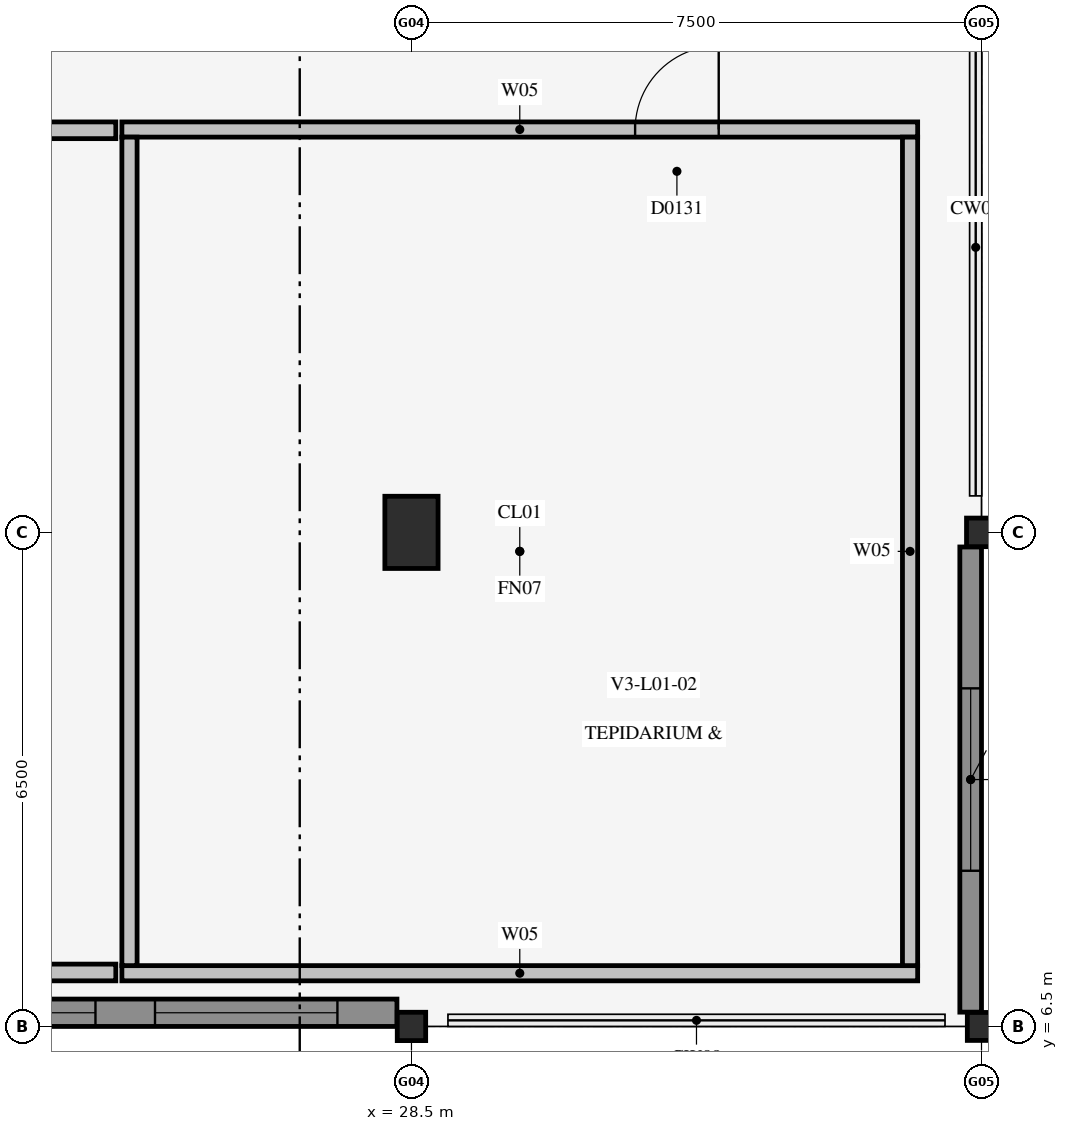
"""IFC4 building model, lengths in metres.
Left out: names, types, materials, properties, quantities, classifications, styles, units other than length and angle.
Written with IfcOpenShell. Run it as: python <this file> out.ifc"""

import sys

from ifc_helpers import new_model, si_unit, direction, frame, frame_2d, origin, origin_2d, place, context, subcontext, project, spatial, rectangle, i_section, extrude, element, fill, save


model = new_model("IFC4")
c1 = context("Model", 3, precision=1e-05, world=origin(), true_north=direction((0.0, 1.0)))
c2 = subcontext(c1, "Body", "Model", "MODEL_VIEW")
j1 = project(units=[si_unit("LENGTHUNIT", "METRE"), si_unit("PLANEANGLEUNIT", "RADIAN")], contexts=[c1])
p1 = place(None, origin())
s1 = spatial("IfcSite", under=j1, at=p1, CompositionType="ELEMENT")
p2 = place(p1, origin())
s2 = spatial("IfcBuilding", under=s1, at=p2, CompositionType="ELEMENT")
p3 = place(p2, frame((0.0, 0.0, 5.4)))
s3 = spatial("IfcBuildingStorey", under=s2, at=p3, CompositionType="ELEMENT", Elevation=5.4)
p4 = place(p3, frame((28.5, 6.5, 0.0), z_axis=(0.0, 0.0, 1.0), x_axis=(1.0, 0.0, 0.0)))
e1 = element("IfcColumn", 1, at=p4, inside=s3, PredefinedType="COLUMN", context=c2, shape_type="SweptSolid", body=[
    extrude(i_section(OverallWidth=0.374, OverallDepth=0.373, WebThickness=0.016, FlangeThickness=0.026, FilletRadius=0.014, at=origin_2d()), origin(), (0.0, 0.0, 1.0), 4.6),
])
p5 = place(p3, frame((28.5, 13.0, 0.0), z_axis=(0.0, 0.0, 1.0), x_axis=(1.0, 0.0, 0.0)))
e2 = element("IfcColumn", 2, at=p5, inside=s3, PredefinedType="COLUMN", context=c2, shape_type="SweptSolid", body=[
    extrude(rectangle(XDim=0.7, YDim=0.95, at=origin_2d()), origin(), (0.0, 0.0, 1.0), 4.6),
])
p6 = place(p3, frame((36.0, 6.5, 0.0), z_axis=(0.0, 0.0, 1.0), x_axis=(1.0, 0.0, 0.0)))
e3 = element("IfcColumn", 3, at=p6, inside=s3, PredefinedType="COLUMN", context=c2, shape_type="SweptSolid", body=[
    extrude(i_section(OverallWidth=0.373, OverallDepth=0.368, WebThickness=0.015, FlangeThickness=0.024, FilletRadius=0.014, at=origin_2d()), origin(), (0.0, 0.0, 1.0), 4.6),
])
p7 = place(p3, frame((36.0, 13.0, 0.0), z_axis=(0.0, 0.0, 1.0), x_axis=(1.0, 0.0, 0.0)))
e4 = element("IfcColumn", 4, at=p7, inside=s3, PredefinedType="COLUMN", context=c2, shape_type="SweptSolid", body=[
    extrude(i_section(OverallWidth=0.394, OverallDepth=0.376, WebThickness=0.017, FlangeThickness=0.028, FilletRadius=0.014, at=origin_2d()), origin(), (0.0, 0.0, 1.0), 4.6),
])
p8 = place(p3, frame((14.14, 7.21, 0.0), z_axis=(0.0, 0.0, 1.0), x_axis=(1.0, 0.0, 0.0)))
e5 = element("IfcWall", 5, at=p8, inside=s3, PredefinedType="PLUMBINGWALL", context=c2, shape_type="SweptSolid", body=[
    extrude(rectangle(XDim=10.47, YDim=0.22, at=frame_2d((5.235, 0.0))), origin(), (0.0, 0.0, 1.0), 4.435),
])
p9 = place(p3, frame((14.14, 18.29, 0.0), z_axis=(0.0, 0.0, 1.0), x_axis=(1.0, 0.0, 0.0)))
e6 = element("IfcWall", 6, at=p9, inside=s3, PredefinedType="PLUMBINGWALL", context=c2, shape_type="SweptSolid", body=[
    extrude(rectangle(XDim=10.47, YDim=0.22, at=frame_2d((5.235, 0.0))), origin(), (0.0, 0.0, 1.0), 4.435),
])
p10 = place(p9, frame((2.63, 0.0, 0.0)))
e7 = element("IfcOpeningElement", 7, at=p10, cuts=e6, PredefinedType="OPENING", context=c2, shape_type="SweptSolid", body=[
    extrude(rectangle(XDim=1.05, YDim=2.15, at=frame_2d((0.525, 1.075))), frame((0.0, 0.122, 0.0), z_axis=(0.0, -1.0, 0.0), x_axis=(1.0, 0.0, 0.0)), (0.0, 0.0, 1.0), 0.244),
])
p11 = place(p3, frame((24.69, 7.2, 0.0), z_axis=(0.0, 0.0, 1.0), x_axis=(1.0, 0.0, 0.0)))
e8 = element("IfcWall", 8, at=p11, inside=s3, PredefinedType="PLUMBINGWALL", context=c2, shape_type="SweptSolid", body=[
    extrude(rectangle(XDim=10.47, YDim=0.2, at=frame_2d((5.235, 0.0))), origin(), (0.0, 0.0, 1.0), 4.435),
])
p12 = place(p3, frame((24.69, 18.3, 0.0), z_axis=(0.0, 0.0, 1.0), x_axis=(1.0, 0.0, 0.0)))
e9 = element("IfcWall", 9, at=p12, inside=s3, PredefinedType="PLUMBINGWALL", context=c2, shape_type="SweptSolid", body=[
    extrude(rectangle(XDim=10.47, YDim=0.2, at=frame_2d((5.235, 0.0))), origin(), (0.0, 0.0, 1.0), 4.435),
])
p13 = place(p12, frame((6.752, 0.0, 0.0)))
e10 = element("IfcOpeningElement", 10, at=p13, cuts=e9, PredefinedType="OPENING", context=c2, shape_type="SweptSolid", body=[
    extrude(rectangle(XDim=1.1, YDim=2.25, at=frame_2d((0.55, 1.125))), frame((0.0, 0.112, 0.0), z_axis=(0.0, -1.0, 0.0), x_axis=(1.0, 0.0, 0.0)), (0.0, 0.0, 1.0), 0.224),
])
for number, where, z_axis, x_axis in (
    (11, (35.06, 7.3, 0.0), (0.0, 0.0, 1.0), (0.0, 1.0, 0.0)),
    (12, (24.79, 7.3, 0.0), (0.0, 0.0, 1.0), (0.0, 1.0, 0.0)),
):
    element("IfcWall", number, at=place(p3, frame(where, z_axis=z_axis, x_axis=x_axis)), inside=s3, PredefinedType="PLUMBINGWALL", context=c2, shape_type="SweptSolid", body=[
        extrude(rectangle(XDim=10.9, YDim=0.2, at=frame_2d((5.45, 0.0))), origin(), (0.0, 0.0, 1.0), 4.435),
    ])
p14 = place(p3, frame((21.159, 6.68, 0.0), z_axis=(0.0, 0.0, 1.0), x_axis=(1.0, 0.0, 0.0)))
e13 = element("IfcWall", 13, at=p14, inside=s3, PredefinedType="SOLIDWALL", context=c2, shape_type="SweptSolid", body=[
    extrude(rectangle(XDim=7.15, YDim=0.36, at=frame_2d((3.575, 0.0))), origin(), (0.0, 0.0, 1.0), 3.958),
])
p15 = place(p14, frame((0.783, 0.0, 0.95)))
e14 = element("IfcOpeningElement", 14, at=p15, cuts=e13, PredefinedType="OPENING", context=c2, shape_type="SweptSolid", body=[
    extrude(rectangle(XDim=2.4, YDim=1.8, at=frame_2d((1.2, 0.9))), frame((0.0, 0.192, 0.0), z_axis=(0.0, -1.0, 0.0), x_axis=(1.0, 0.0, 0.0)), (0.0, 0.0, 1.0), 0.384),
])
p16 = place(p14, frame((3.967, 0.0, 0.95)))
e15 = element("IfcOpeningElement", 15, at=p16, cuts=e13, PredefinedType="OPENING", context=c2, shape_type="SweptSolid", body=[
    extrude(rectangle(XDim=2.4, YDim=1.8, at=frame_2d((1.2, 0.9))), frame((0.0, 0.192, 0.0), z_axis=(0.0, -1.0, 0.0), x_axis=(1.0, 0.0, 0.0)), (0.0, 0.0, 1.0), 0.384),
])
p17 = place(p3, frame((35.857, 6.688, 0.0), z_axis=(0.0, 0.0, 1.0), x_axis=(0.0, 1.0, 0.0)))
e16 = element("IfcWall", 16, at=p17, inside=s3, PredefinedType="SOLIDWALL", context=c2, shape_type="SweptSolid", body=[
    extrude(rectangle(XDim=6.12, YDim=0.285, at=frame_2d((3.06, 0.0))), origin(), (0.0, 0.0, 1.0), 4.034),
])
p18 = place(p17, frame((1.86, 0.0, 0.95)))
e17 = element("IfcOpeningElement", 17, at=p18, cuts=e16, PredefinedType="OPENING", context=c2, shape_type="SweptSolid", body=[
    extrude(rectangle(XDim=2.4, YDim=2.1, at=frame_2d((1.2, 1.05))), frame((0.0, 0.154, 0.0), z_axis=(0.0, -1.0, 0.0), x_axis=(1.0, 0.0, 0.0)), (0.0, 0.0, 1.0), 0.309),
])
p19 = place(p13, frame((1.1, 0.0, 0.0), z_axis=(0.0, 0.0, 1.0), x_axis=(-1.0, 0.0, 0.0)))
e18 = element("IfcDoor", 18, at=p19, inside=s3, OperationType="SINGLE_SWING_RIGHT", PredefinedType="DOOR", context=c2, shape_type="SweptSolid", body=[
    extrude(rectangle(XDim=1.1, YDim=2.25, at=frame_2d((0.55, 1.125))), frame((0.0, 0.025, 0.0), z_axis=(0.0, -1.0, 0.0), x_axis=(1.0, 0.0, 0.0)), (0.0, 0.0, 1.0), 0.05),
])
fill(e10, e18)
p20 = place(p15, origin())
e19 = element("IfcWindow", 19, at=p20, inside=s3, PartitioningType="SINGLE_PANEL", PredefinedType="WINDOW", context=c2, shape_type="SweptSolid", body=[
    extrude(rectangle(XDim=2.4, YDim=1.8, at=frame_2d((1.2, 0.9))), frame((0.0, 0.03, 0.0), z_axis=(0.0, -1.0, 0.0), x_axis=(1.0, 0.0, 0.0)), (0.0, 0.0, 1.0), 0.06),
])
fill(e14, e19)
p21 = place(p16, origin())
e20 = element("IfcWindow", 20, at=p21, inside=s3, PartitioningType="SINGLE_PANEL", PredefinedType="WINDOW", context=c2, shape_type="SweptSolid", body=[
    extrude(rectangle(XDim=2.4, YDim=1.8, at=frame_2d((1.2, 0.9))), frame((0.0, 0.03, 0.0), z_axis=(0.0, -1.0, 0.0), x_axis=(1.0, 0.0, 0.0)), (0.0, 0.0, 1.0), 0.06),
])
fill(e15, e20)
p22 = place(p18, origin())
e21 = element("IfcWindow", 21, at=p22, inside=s3, PartitioningType="SINGLE_PANEL", PredefinedType="WINDOW", context=c2, shape_type="SweptSolid", body=[
    extrude(rectangle(XDim=2.4, YDim=2.1, at=frame_2d((1.2, 1.05))), frame((0.0, 0.03, 0.0), z_axis=(0.0, -1.0, 0.0), x_axis=(1.0, 0.0, 0.0)), (0.0, 0.0, 1.0), 0.06),
])
fill(e17, e21)
save(model, sys.argv[1])
